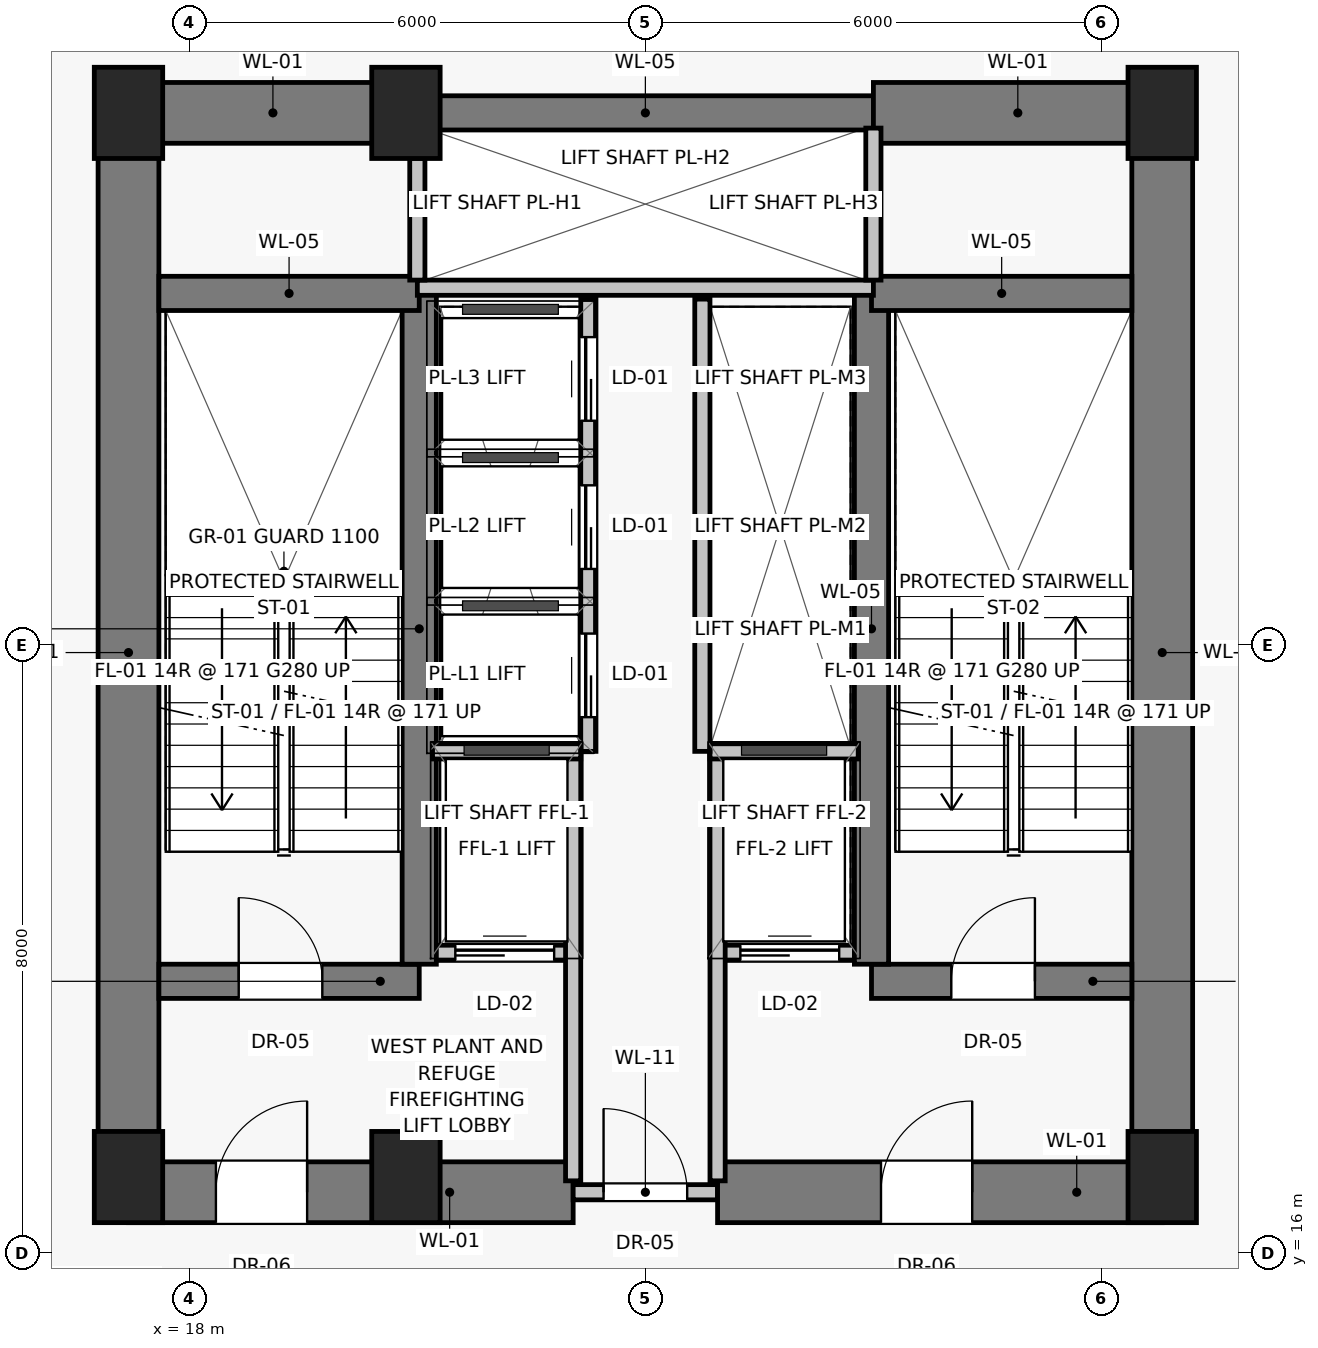
"""IFC4 building model, lengths in metres.
Left out: names, types, materials, properties, quantities, classifications, styles, units other than length and angle.
Written with IfcOpenShell. Run it as: python <this file> out.ifc"""

import sys

from ifc_helpers import new_model, si_unit, direction, frame, frame_2d, origin, origin_2d, place, context, subcontext, project, spatial, rectangle, extrude, source, transform, mapped, element, fill, save


model = new_model("IFC4")
c1 = context("Model", 3, precision=1e-05, world=origin(), true_north=direction((0.0, 1.0)))
c2 = subcontext(c1, "Body", "Model", "MODEL_VIEW")
j1 = project(units=[si_unit("LENGTHUNIT", "METRE"), si_unit("PLANEANGLEUNIT", "RADIAN")], contexts=[c1])
p1 = place(None, origin())
s1 = spatial("IfcSite", under=j1, at=p1, CompositionType="ELEMENT")
p2 = place(p1, origin())
s2 = spatial("IfcBuilding", under=s1, at=p2, CompositionType="ELEMENT")
p3 = place(p2, frame((0.0, 0.0, 80.35)))
s3 = spatial("IfcBuildingStorey", under=s2, at=p3, CompositionType="ELEMENT", Elevation=80.35)
for number, where, z_axis, x_axis in (
    (1, (17.2, 17.0, 0.0), (0.0, 0.0, 1.0), (1.0, 0.0, 0.0)),
    (2, (20.85, 17.0, 0.0), (0.0, 0.0, 1.0), (1.0, 0.0, 0.0)),
    (3, (30.8, 17.0, 0.0), (0.0, 0.0, 1.0), (1.0, 0.0, 0.0)),
    (4, (17.2, 31.0, 0.0), (0.0, 0.0, 1.0), (1.0, 0.0, 0.0)),
    (5, (20.85, 31.0, 0.0), (0.0, 0.0, 1.0), (1.0, 0.0, 0.0)),
    (6, (30.8, 31.0, 0.0), (0.0, 0.0, 1.0), (1.0, 0.0, 0.0)),
):
    element("IfcColumn", number, at=place(p3, frame(where, z_axis=z_axis, x_axis=x_axis)), inside=s3, PredefinedType="PILASTER", context=c2, shape_type="SweptSolid", body=[
        extrude(rectangle(XDim=0.9, YDim=1.2, at=origin_2d()), origin(), (0.0, 0.0, 1.0), 4.8),
    ])
for number, where, z_axis, x_axis in (
    (7, (17.2, 16.8, 0.0), (0.0, 0.0, 1.0), (0.0, 1.0, 0.0)),
    (8, (30.8, 16.8, 0.0), (0.0, 0.0, 1.0), (0.0, 1.0, 0.0)),
):
    element("IfcWall", number, at=place(p3, frame(where, z_axis=z_axis, x_axis=x_axis)), inside=s3, PredefinedType="SHEAR", context=c2, shape_type="SweptSolid", body=[
        extrude(rectangle(XDim=14.2, YDim=0.8, at=frame_2d((7.1, 0.0))), origin(), (0.0, 0.0, 1.0), 4.48),
    ])
p4 = place(p3, frame((17.2, 16.8, 0.0), z_axis=(0.0, 0.0, 1.0), x_axis=(1.0, 0.0, 0.0)))
e9 = element("IfcWall", 9, at=p4, inside=s3, PredefinedType="SHEAR", context=c2, shape_type="SweptSolid", body=[
    extrude(rectangle(XDim=5.85, YDim=0.8, at=frame_2d((2.925, 0.0))), origin(), (0.0, 0.0, 1.0), 4.48),
])
p5 = place(p4, frame((1.15, 0.0, 0.0)))
e10 = element("IfcOpeningElement", 10, at=p5, cuts=e9, PredefinedType="OPENING", context=c2, shape_type="SweptSolid", body=[
    extrude(rectangle(XDim=1.2, YDim=2.03, at=frame_2d((0.6, 1.015))), frame((0.0, 0.41, 0.0), z_axis=(0.0, -1.0, 0.0), x_axis=(1.0, 0.0, 0.0)), (0.0, 0.0, 1.0), 0.82),
])
p6 = place(p3, frame((23.05, 16.8, 0.0), z_axis=(0.0, 0.0, 1.0), x_axis=(1.0, 0.0, 0.0)))
e11 = element("IfcWall", 11, at=p6, inside=s3, PredefinedType="SOLIDWALL", context=c2, shape_type="SweptSolid", body=[
    extrude(rectangle(XDim=1.9, YDim=0.2, at=frame_2d((0.95, 0.0))), origin(), (0.0, 0.0, 1.0), 2.28),
])
p7 = place(p6, frame((0.4, 0.0, 0.0)))
e12 = element("IfcOpeningElement", 12, at=p7, cuts=e11, PredefinedType="OPENING", context=c2, shape_type="SweptSolid", body=[
    extrude(rectangle(XDim=1.1, YDim=2.03, at=frame_2d((0.55, 1.015))), frame((0.0, 0.11, 0.0), z_axis=(0.0, -1.0, 0.0), x_axis=(1.0, 0.0, 0.0)), (0.0, 0.0, 1.0), 0.22),
])
p8 = place(p3, frame((24.95, 16.8, 0.0), z_axis=(0.0, 0.0, 1.0), x_axis=(1.0, 0.0, 0.0)))
e13 = element("IfcWall", 13, at=p8, inside=s3, PredefinedType="SHEAR", context=c2, shape_type="SweptSolid", body=[
    extrude(rectangle(XDim=5.85, YDim=0.8, at=frame_2d((2.925, 0.0))), origin(), (0.0, 0.0, 1.0), 4.48),
])
p9 = place(p8, frame((2.15, 0.0, 0.0)))
e14 = element("IfcOpeningElement", 14, at=p9, cuts=e13, PredefinedType="OPENING", context=c2, shape_type="SweptSolid", body=[
    extrude(rectangle(XDim=1.2, YDim=2.03, at=frame_2d((0.6, 1.015))), frame((0.0, 0.41, 0.0), z_axis=(0.0, -1.0, 0.0), x_axis=(1.0, 0.0, 0.0)), (0.0, 0.0, 1.0), 0.82),
])
p10 = place(p3, frame((17.2, 31.0, 0.0), z_axis=(0.0, 0.0, 1.0), x_axis=(1.0, 0.0, 0.0)))
e15 = element("IfcWall", 15, at=p10, inside=s3, PredefinedType="SHEAR", context=c2, shape_type="SweptSolid", body=[
    extrude(rectangle(XDim=3.8, YDim=0.8, at=frame_2d((1.9, 0.0))), origin(), (0.0, 0.0, 1.0), 4.48),
])
p11 = place(p3, frame((21.0, 31.0, 0.0), z_axis=(0.0, 0.0, 1.0), x_axis=(1.0, 0.0, 0.0)))
e16 = element("IfcWall", 16, at=p11, inside=s3, PredefinedType="SHEAR", context=c2, shape_type="SweptSolid", body=[
    extrude(rectangle(XDim=6.0, YDim=0.45, at=frame_2d((3.0, 0.0))), origin(), (0.0, 0.0, 1.0), 4.48),
])
p12 = place(p3, frame((27.0, 31.0, 0.0), z_axis=(0.0, 0.0, 1.0), x_axis=(1.0, 0.0, 0.0)))
e17 = element("IfcWall", 17, at=p12, inside=s3, PredefinedType="SHEAR", context=c2, shape_type="SweptSolid", body=[
    extrude(rectangle(XDim=3.8, YDim=0.8, at=frame_2d((1.9, 0.0))), origin(), (0.0, 0.0, 1.0), 4.48),
])
p13 = place(p3, frame((17.6, 19.575, 0.0), z_axis=(0.0, 0.0, 1.0), x_axis=(1.0, 0.0, 0.0)))
e18 = element("IfcWall", 18, at=p13, inside=s3, PredefinedType="SHEAR", context=c2, shape_type="SweptSolid", body=[
    extrude(rectangle(XDim=3.425, YDim=0.45, at=frame_2d((1.712, 0.0))), origin(), (0.0, 0.0, 1.0), 4.48),
])
p14 = place(p13, frame((1.05, 0.0, 0.0)))
e19 = element("IfcOpeningElement", 19, at=p14, cuts=e18, PredefinedType="OPENING", context=c2, shape_type="SweptSolid", body=[
    extrude(rectangle(XDim=1.1, YDim=2.03, at=frame_2d((0.55, 1.015))), frame((0.0, 0.235, 0.0), z_axis=(0.0, -1.0, 0.0), x_axis=(1.0, 0.0, 0.0)), (0.0, 0.0, 1.0), 0.47),
])
p15 = place(p3, frame((21.2, 19.95, 0.0), z_axis=(0.0, 0.0, 1.0), x_axis=(1.0, 0.0, 0.0)))
e20 = element("IfcWall", 20, at=p15, inside=s3, PredefinedType="SOLIDWALL", context=c2, shape_type="SweptSolid", body=[
    extrude(rectangle(XDim=1.85, YDim=0.2, at=frame_2d((0.925, 0.0))), origin(), (0.0, 0.0, 1.0), 4.48),
])
p16 = place(p15, frame((0.3, 0.0, 0.0)))
e21 = element("IfcOpeningElement", 21, at=p16, cuts=e20, PredefinedType="OPENING", context=c2, shape_type="SweptSolid", body=[
    extrude(rectangle(XDim=1.3, YDim=2.25, at=frame_2d((0.65, 1.125))), frame((0.0, 0.11, 0.0), z_axis=(0.0, -1.0, 0.0), x_axis=(1.0, 0.0, 0.0)), (0.0, 0.0, 1.0), 0.22),
])
p17 = place(p3, frame((24.95, 19.95, 0.0), z_axis=(0.0, 0.0, 1.0), x_axis=(1.0, 0.0, 0.0)))
e22 = element("IfcWall", 22, at=p17, inside=s3, PredefinedType="SOLIDWALL", context=c2, shape_type="SweptSolid", body=[
    extrude(rectangle(XDim=1.85, YDim=0.2, at=frame_2d((0.925, 0.0))), origin(), (0.0, 0.0, 1.0), 4.48),
])
p18 = place(p17, frame((0.3, 0.0, 0.0)))
e23 = element("IfcOpeningElement", 23, at=p18, cuts=e22, PredefinedType="OPENING", context=c2, shape_type="SweptSolid", body=[
    extrude(rectangle(XDim=1.3, YDim=2.25, at=frame_2d((0.65, 1.125))), frame((0.0, 0.11, 0.0), z_axis=(0.0, -1.0, 0.0), x_axis=(1.0, 0.0, 0.0)), (0.0, 0.0, 1.0), 0.22),
])
p19 = place(p3, frame((26.975, 19.575, 0.0), z_axis=(0.0, 0.0, 1.0), x_axis=(1.0, 0.0, 0.0)))
e24 = element("IfcWall", 24, at=p19, inside=s3, PredefinedType="SHEAR", context=c2, shape_type="SweptSolid", body=[
    extrude(rectangle(XDim=3.425, YDim=0.45, at=frame_2d((1.712, 0.0))), origin(), (0.0, 0.0, 1.0), 4.48),
])
p20 = place(p19, frame((1.05, 0.0, 0.0)))
e25 = element("IfcOpeningElement", 25, at=p20, cuts=e24, PredefinedType="OPENING", context=c2, shape_type="SweptSolid", body=[
    extrude(rectangle(XDim=1.1, YDim=2.03, at=frame_2d((0.55, 1.015))), frame((0.0, 0.235, 0.0), z_axis=(0.0, -1.0, 0.0), x_axis=(1.0, 0.0, 0.0)), (0.0, 0.0, 1.0), 0.47),
])
for number, where, z_axis, x_axis in (
    (26, (21.025, 19.8, 0.0), (0.0, 0.0, 1.0), (0.0, 1.0, 0.0)),
    (27, (26.975, 19.8, 0.0), (0.0, 0.0, 1.0), (0.0, 1.0, 0.0)),
):
    element("IfcWall", number, at=place(p3, frame(where, z_axis=z_axis, x_axis=x_axis)), inside=s3, PredefinedType="SHEAR", context=c2, shape_type="SweptSolid", body=[
        extrude(rectangle(XDim=8.825, YDim=0.45, at=frame_2d((4.413, 0.0))), origin(), (0.0, 0.0, 1.0), 4.48),
    ])
for number, where, z_axis, x_axis in (
    (28, (17.6, 28.625, 0.0), (0.0, 0.0, 1.0), (1.0, 0.0, 0.0)),
    (29, (26.975, 28.625, 0.0), (0.0, 0.0, 1.0), (1.0, 0.0, 0.0)),
):
    element("IfcWall", number, at=place(p3, frame(where, z_axis=z_axis, x_axis=x_axis)), inside=s3, PredefinedType="SHEAR", context=c2, shape_type="SweptSolid", body=[
        extrude(rectangle(XDim=3.425, YDim=0.45, at=frame_2d((1.712, 0.0))), origin(), (0.0, 0.0, 1.0), 4.48),
    ])
for number, where, z_axis, x_axis in (
    (30, (23.05, 16.95, 0.0), (0.0, 0.0, 1.0), (0.0, 1.0, 0.0)),
    (31, (24.95, 16.95, 0.0), (0.0, 0.0, 1.0), (0.0, 1.0, 0.0)),
):
    element("IfcWall", number, at=place(p3, frame(where, z_axis=z_axis, x_axis=x_axis)), inside=s3, PredefinedType="SOLIDWALL", context=c2, shape_type="SweptSolid", body=[
        extrude(rectangle(XDim=5.6, YDim=0.2, at=frame_2d((2.8, 0.0))), origin(), (0.0, 0.0, 1.0), 2.28),
    ])
for number, where, z_axis, x_axis in (
    (32, (21.2, 22.6, 0.0), (0.0, 0.0, 1.0), (1.0, 0.0, 0.0)),
    (33, (24.85, 22.6, 0.0), (0.0, 0.0, 1.0), (1.0, 0.0, 0.0)),
):
    element("IfcWall", number, at=place(p3, frame(where, z_axis=z_axis, x_axis=x_axis)), inside=s3, PredefinedType="SOLIDWALL", context=c2, shape_type="SweptSolid", body=[
        extrude(rectangle(XDim=1.95, YDim=0.2, at=frame_2d((0.975, 0.0))), origin(), (0.0, 0.0, 1.0), 4.48),
    ])
p21 = place(p3, frame((21.0, 28.7, 0.0), z_axis=(0.0, 0.0, 1.0), x_axis=(1.0, 0.0, 0.0)))
e34 = element("IfcWall", 34, at=p21, inside=s3, PredefinedType="SOLIDWALL", context=c2, shape_type="SweptSolid", body=[
    extrude(rectangle(XDim=6.0, YDim=0.2, at=frame_2d((3.0, 0.0))), origin(), (0.0, 0.0, 1.0), 4.48),
])
p22 = place(p3, frame((21.0, 28.8, 0.0), z_axis=(0.0, 0.0, 1.0), x_axis=(0.0, 1.0, 0.0)))
e35 = element("IfcWall", 35, at=p22, inside=s3, PredefinedType="SOLIDWALL", context=c2, shape_type="SweptSolid", body=[
    extrude(rectangle(XDim=1.6, YDim=0.2, at=frame_2d((0.8, 0.0))), origin(), (0.0, 0.0, 1.0), 4.48),
])
p23 = place(p3, frame((27.0, 28.8, 0.0), z_axis=(0.0, 0.0, 1.0), x_axis=(0.0, 1.0, 0.0)))
e36 = element("IfcWall", 36, at=p23, inside=s3, PredefinedType="SOLIDWALL", context=c2, shape_type="SweptSolid", body=[
    extrude(rectangle(XDim=2.0, YDim=0.2, at=frame_2d((1.0, 0.0))), origin(), (0.0, 0.0, 1.0), 4.48),
])
p24 = place(p3, frame((23.25, 22.6, 0.0), z_axis=(0.0, 0.0, 1.0), x_axis=(0.0, 1.0, 0.0)))
e37 = element("IfcWall", 37, at=p24, inside=s3, PredefinedType="SOLIDWALL", context=c2, shape_type="SweptSolid", body=[
    extrude(rectangle(XDim=5.95, YDim=0.2, at=frame_2d((2.975, 0.0))), origin(), (0.0, 0.0, 1.0), 4.48),
])
p25 = place(p24, frame((0.45, 0.0, 0.0)))
e38 = element("IfcOpeningElement", 38, at=p25, cuts=e37, PredefinedType="OPENING", context=c2, shape_type="SweptSolid", body=[
    extrude(rectangle(XDim=1.1, YDim=2.08, at=frame_2d((0.55, 1.04))), frame((0.0, 0.11, 0.0), z_axis=(0.0, -1.0, 0.0), x_axis=(1.0, 0.0, 0.0)), (0.0, 0.0, 1.0), 0.22),
])
p26 = place(p24, frame((2.4, 0.0, 0.0)))
e39 = element("IfcOpeningElement", 39, at=p26, cuts=e37, PredefinedType="OPENING", context=c2, shape_type="SweptSolid", body=[
    extrude(rectangle(XDim=1.1, YDim=2.08, at=frame_2d((0.55, 1.04))), frame((0.0, 0.11, 0.0), z_axis=(0.0, -1.0, 0.0), x_axis=(1.0, 0.0, 0.0)), (0.0, 0.0, 1.0), 0.22),
])
p27 = place(p24, frame((4.35, 0.0, 0.0)))
e40 = element("IfcOpeningElement", 40, at=p27, cuts=e37, PredefinedType="OPENING", context=c2, shape_type="SweptSolid", body=[
    extrude(rectangle(XDim=1.1, YDim=2.08, at=frame_2d((0.55, 1.04))), frame((0.0, 0.11, 0.0), z_axis=(0.0, -1.0, 0.0), x_axis=(1.0, 0.0, 0.0)), (0.0, 0.0, 1.0), 0.22),
])
p28 = place(p3, frame((24.75, 22.6, 0.0), z_axis=(0.0, 0.0, 1.0), x_axis=(0.0, 1.0, 0.0)))
e41 = element("IfcWall", 41, at=p28, inside=s3, PredefinedType="SOLIDWALL", context=c2, shape_type="SweptSolid", body=[
    extrude(rectangle(XDim=5.95, YDim=0.2, at=frame_2d((2.975, 0.0))), origin(), (0.0, 0.0, 1.0), 4.48),
])
m1 = source(origin(), c2, "Body", "SweptSolid", [
    extrude(rectangle(XDim=1.2, YDim=2.03, at=frame_2d((0.6, 1.015))), frame((0.0, 0.025, 0.0), z_axis=(0.0, -1.0, 0.0), x_axis=(1.0, 0.0, 0.0)), (0.0, 0.0, 1.0), 0.05),
])
p29 = place(p5, origin())
e42 = element("IfcDoor", 42, at=p29, inside=s3, OperationType="SINGLE_SWING_RIGHT", PredefinedType="DOOR", context=c2, shape_type="MappedRepresentation", body=[
    mapped(m1, transform((0.0, 0.0, 0.0), scale=1.0)),
])
fill(e10, e42)
m2 = source(origin(), c2, "Body", "SweptSolid", [
    extrude(rectangle(XDim=1.1, YDim=2.03, at=frame_2d((0.55, 1.015))), frame((0.0, 0.025, 0.0), z_axis=(0.0, -1.0, 0.0), x_axis=(1.0, 0.0, 0.0)), (0.0, 0.0, 1.0), 0.05),
])
p30 = place(p7, origin())
e43 = element("IfcDoor", 43, at=p30, inside=s3, OperationType="SINGLE_SWING_LEFT", PredefinedType="DOOR", context=c2, shape_type="MappedRepresentation", body=[
    mapped(m2, transform((0.0, 0.0, 0.0), scale=1.0)),
])
fill(e12, e43)
p31 = place(p9, origin())
e44 = element("IfcDoor", 44, at=p31, inside=s3, OperationType="SINGLE_SWING_RIGHT", PredefinedType="DOOR", context=c2, shape_type="MappedRepresentation", body=[
    mapped(m1, transform((0.0, 0.0, 0.0), scale=1.0)),
])
fill(e14, e44)
p32 = place(p14, origin())
e45 = element("IfcDoor", 45, at=p32, inside=s3, OperationType="SINGLE_SWING_LEFT", PredefinedType="DOOR", context=c2, shape_type="MappedRepresentation", body=[
    mapped(m2, transform((0.0, 0.0, 0.0), scale=1.0)),
])
fill(e19, e45)
m3 = source(origin(), c2, "Body", "SweptSolid", [
    extrude(rectangle(XDim=1.3, YDim=2.25, at=frame_2d((0.65, 1.125))), frame((0.0, 0.025, 0.0), z_axis=(0.0, -1.0, 0.0), x_axis=(1.0, 0.0, 0.0)), (0.0, 0.0, 1.0), 0.05),
])
p33 = place(p16, origin())
e46 = element("IfcDoor", 46, at=p33, inside=s3, OperationType="SLIDING_TO_LEFT", PredefinedType="DOOR", context=c2, shape_type="MappedRepresentation", body=[
    mapped(m3, transform((0.0, 0.0, 0.0), scale=1.0)),
])
fill(e21, e46)
p34 = place(p18, origin())
e47 = element("IfcDoor", 47, at=p34, inside=s3, OperationType="SLIDING_TO_LEFT", PredefinedType="DOOR", context=c2, shape_type="MappedRepresentation", body=[
    mapped(m3, transform((0.0, 0.0, 0.0), scale=1.0)),
])
fill(e23, e47)
p35 = place(p20, origin())
e48 = element("IfcDoor", 48, at=p35, inside=s3, OperationType="SINGLE_SWING_RIGHT", PredefinedType="DOOR", context=c2, shape_type="MappedRepresentation", body=[
    mapped(m2, transform((0.0, 0.0, 0.0), scale=1.0)),
])
fill(e25, e48)
m4 = source(origin(), c2, "Body", "SweptSolid", [
    extrude(rectangle(XDim=1.1, YDim=2.08, at=frame_2d((0.55, 1.04))), frame((0.0, 0.025, 0.0), z_axis=(0.0, -1.0, 0.0), x_axis=(1.0, 0.0, 0.0)), (0.0, 0.0, 1.0), 0.05),
])
p36 = place(p25, origin())
e49 = element("IfcDoor", 49, at=p36, inside=s3, OperationType="SLIDING_TO_LEFT", PredefinedType="DOOR", context=c2, shape_type="MappedRepresentation", body=[
    mapped(m4, transform((0.0, 0.0, 0.0), scale=1.0)),
])
fill(e38, e49)
p37 = place(p26, origin())
e50 = element("IfcDoor", 50, at=p37, inside=s3, OperationType="SLIDING_TO_LEFT", PredefinedType="DOOR", context=c2, shape_type="MappedRepresentation", body=[
    mapped(m4, transform((0.0, 0.0, 0.0), scale=1.0)),
])
fill(e39, e50)
p38 = place(p27, origin())
e51 = element("IfcDoor", 51, at=p38, inside=s3, OperationType="SLIDING_TO_LEFT", PredefinedType="DOOR", context=c2, shape_type="MappedRepresentation", body=[
    mapped(m4, transform((0.0, 0.0, 0.0), scale=1.0)),
])
fill(e40, e51)
save(model, sys.argv[1])
